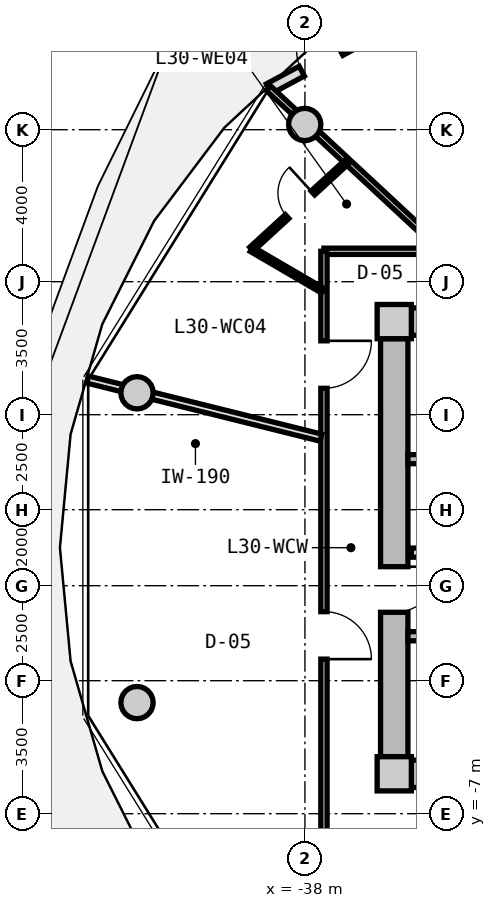
"""IFC4 building model, lengths in metres.
Left out: names, types, materials, properties, quantities, classifications, styles, units other than length and angle.
Written with IfcOpenShell. Run it as: python <this file> out.ifc"""

import sys

from ifc_helpers import new_model, si_unit, direction, frame, frame_2d, origin, origin_2d, place, context, subcontext, project, spatial, rectangle, circle, extrude, source, transform, mapped, element, fill, save


model = new_model("IFC4")
c1 = context("Model", 3, precision=1e-05, world=origin(), true_north=direction((0.0, 1.0)))
c2 = subcontext(c1, "Body", "Model", "MODEL_VIEW")
j1 = project(units=[si_unit("LENGTHUNIT", "METRE"), si_unit("PLANEANGLEUNIT", "RADIAN")], contexts=[c1])
p1 = place(None, origin())
s1 = spatial("IfcSite", under=j1, at=p1, CompositionType="ELEMENT")
p2 = place(p1, origin())
s2 = spatial("IfcBuilding", under=s1, at=p2, CompositionType="ELEMENT")
p3 = place(p2, frame((0.0, 0.0, 99.3)))
s3 = spatial("IfcBuildingStorey", under=s2, at=p3, CompositionType="ELEMENT", Elevation=99.3)
m1 = source(origin(), c2, "Body", "SweptSolid", [
    extrude(rectangle(XDim=0.9, YDim=0.9, at=origin_2d()), origin(), (0.0, 0.0, 1.0), 3.05),
])
for number, where, z_axis, x_axis in (
    (1, (-35.65, -5.95, 0.0), (0.0, 0.0, 1.0), (1.0, 0.0, 0.0)),
    (2, (-35.65, 5.95, 0.0), (0.0, 0.0, 1.0), (1.0, 0.0, 0.0)),
):
    element("IfcColumn", number, at=place(p3, frame(where, z_axis=z_axis, x_axis=x_axis)), inside=s3, PredefinedType="COLUMN", context=c2, shape_type="MappedRepresentation", body=[
        mapped(m1, transform((0.0, 0.0, 0.0), x_axis=(1.0, 0.0, 0.0), y_axis=(0.0, 1.0, 0.0), z_axis=(0.0, 0.0, 1.0), scale=1.0)),
    ])
m2 = source(origin(), c2, "Body", "SweptSolid", [
    extrude(rectangle(XDim=14.4, YDim=0.72, at=frame_2d((7.2, 0.0))), origin(), (0.0, 0.0, 1.0), 2.79),
])
for number, where, z_axis, x_axis in (
    (3, (-35.2, 5.95, 0.0), (0.0, 0.0, 1.0), (1.0, 0.0, 0.0)),
    (4, (-20.8, -5.95, 0.0), (0.0, 0.0, 1.0), (-1.0, 0.0, 0.0)),
):
    element("IfcWall", number, at=place(p3, frame(where, z_axis=z_axis, x_axis=x_axis)), inside=s3, PredefinedType="SHEAR", context=c2, shape_type="MappedRepresentation", body=[
        mapped(m2, transform((0.0, 0.0, 0.0), x_axis=(1.0, 0.0, 0.0), y_axis=(0.0, 1.0, 0.0), z_axis=(0.0, 0.0, 1.0), scale=1.0)),
    ])
m3 = source(origin(), c2, "Body", "SweptSolid", [
    extrude(rectangle(XDim=11.0, YDim=0.72, at=frame_2d((5.5, 0.0))), origin(), (0.0, 0.0, 1.0), 2.79),
])
p4 = place(p3, frame((-35.65, -5.5, 0.0), z_axis=(0.0, 0.0, 1.0), x_axis=(0.0, 1.0, 0.0)))
e5 = element("IfcWall", 5, at=p4, inside=s3, PredefinedType="SHEAR", context=c2, shape_type="MappedRepresentation", body=[
    mapped(m3, transform((0.0, 0.0, 0.0), x_axis=(1.0, 0.0, 0.0), y_axis=(0.0, 1.0, 0.0), z_axis=(0.0, 0.0, 1.0), scale=1.0)),
])
p5 = place(p4, frame((3.8, 0.0, 0.0)))
e6 = element("IfcOpeningElement", 6, at=p5, cuts=e5, PredefinedType="OPENING", context=c2, shape_type="SweptSolid", body=[
    extrude(rectangle(XDim=1.2, YDim=2.15, at=frame_2d((0.6, 1.075))), frame((0.0, 0.37, 0.0), z_axis=(0.0, -1.0, 0.0), x_axis=(1.0, 0.0, 0.0)), (0.0, 0.0, 1.0), 0.74),
])
m4 = source(origin(), c2, "Body", "SweptSolid", [
    extrude(circle(Radius=0.425, at=origin_2d()), origin(), (0.0, 0.0, 1.0), 3.05),
])
for number, where, z_axis, x_axis in (
    (7, (-38.006, 11.137, 0.0), (0.0, 0.0, 1.0), (1.0, 0.0, 0.0)),
    (8, (-42.419, 4.076, 0.0), (0.0, 0.0, 1.0), (1.0, 0.0, 0.0)),
    (9, (-42.419, -4.076, 0.0), (0.0, 0.0, 1.0), (1.0, 0.0, 0.0)),
):
    element("IfcColumn", number, at=place(p3, frame(where, z_axis=z_axis, x_axis=x_axis)), inside=s3, PredefinedType="COLUMN", context=c2, shape_type="MappedRepresentation", body=[
        mapped(m4, transform((0.0, 0.0, 0.0), x_axis=(1.0, 0.0, 0.0), y_axis=(0.0, 1.0, 0.0), z_axis=(0.0, 0.0, 1.0), scale=1.0)),
    ])
m5 = source(origin(), c2, "Body", "SweptSolid", [
    extrude(rectangle(XDim=9.351, YDim=0.29, at=frame_2d((4.675, 0.0))), origin(), (0.0, 0.0, 1.0), 2.79),
])
p6 = place(p3, frame((-38.947, 12.077, 0.0), z_axis=(0.0, 0.0, 1.0), x_axis=(0.881184411073, 0.472772708267, 0.0)))
e10 = element("IfcWall", 10, at=p6, inside=s3, PredefinedType="SOLIDWALL", context=c2, shape_type="MappedRepresentation", body=[
    mapped(m5, transform((0.0, 0.0, 0.0), x_axis=(1.0, 0.0, 0.0), y_axis=(0.0, 1.0, 0.0), z_axis=(0.0, 0.0, 1.0), scale=1.0)),
])
p7 = place(p6, frame((0.98, 0.0, 0.0)))
e11 = element("IfcOpeningElement", 11, at=p7, cuts=e10, PredefinedType="OPENING", context=c2, shape_type="SweptSolid", body=[
    extrude(rectangle(XDim=1.15, YDim=2.25, at=frame_2d((0.575, 1.125))), frame((0.0, 0.155, 0.0), z_axis=(0.0, -1.0, 0.0), x_axis=(1.0, 0.0, 0.0)), (0.0, 0.0, 1.0), 0.31),
])
p8 = place(p6, frame((5.025, 0.0, 0.85)))
e12 = element("IfcOpeningElement", 12, at=p8, cuts=e10, PredefinedType="OPENING", context=c2, shape_type="SweptSolid", body=[
    extrude(rectangle(XDim=1.2, YDim=1.5, at=frame_2d((0.6, 0.75))), frame((0.0, 0.155, 0.0), z_axis=(0.0, -1.0, 0.0), x_axis=(1.0, 0.0, 0.0)), (0.0, 0.0, 1.0), 0.31),
])
m6 = source(origin(), c2, "Body", "SweptSolid", [
    extrude(rectangle(XDim=7.83, YDim=0.24, at=frame_2d((3.915, 0.0))), origin(), (0.0, 0.0, 1.0), 2.79),
])
p9 = place(p3, frame((-35.29, 2.33, 0.0), z_axis=(0.0, 0.0, 1.0), x_axis=(1.0, 0.0, 0.0)))
e13 = element("IfcWall", 13, at=p9, inside=s3, PredefinedType="PARTITIONING", context=c2, shape_type="MappedRepresentation", body=[
    mapped(m6, transform((0.0, 0.0, 0.0), x_axis=(1.0, 0.0, 0.0), y_axis=(0.0, 1.0, 0.0), z_axis=(0.0, 0.0, 1.0), scale=1.0)),
])
p10 = place(p3, frame((-35.29, -2.33, 0.0), z_axis=(0.0, 0.0, 1.0), x_axis=(1.0, 0.0, 0.0)))
e14 = element("IfcWall", 14, at=p10, inside=s3, PredefinedType="PARTITIONING", context=c2, shape_type="MappedRepresentation", body=[
    mapped(m6, transform((0.0, 0.0, 0.0), x_axis=(1.0, 0.0, 0.0), y_axis=(0.0, 1.0, 0.0), z_axis=(0.0, 0.0, 1.0), scale=1.0)),
])
p11 = place(p10, frame((0.95, 0.0, 0.0)))
e15 = element("IfcOpeningElement", 15, at=p11, cuts=e14, PredefinedType="OPENING", context=c2, shape_type="SweptSolid", body=[
    extrude(rectangle(XDim=1.1, YDim=2.15, at=frame_2d((0.55, 1.075))), frame((0.0, 0.13, 0.0), z_axis=(0.0, -1.0, 0.0), x_axis=(1.0, 0.0, 0.0)), (0.0, 0.0, 1.0), 0.26),
])
m7 = source(origin(), c2, "Body", "SweptSolid", [
    extrude(rectangle(XDim=7.62, YDim=0.24, at=frame_2d((3.81, 0.0))), origin(), (0.0, 0.0, 1.0), 2.775),
])
p12 = place(p3, frame((-35.2, -0.13, 0.0), z_axis=(0.0, 0.0, 1.0), x_axis=(1.0, 0.0, 0.0)))
e16 = element("IfcWall", 16, at=p12, inside=s3, PredefinedType="PARTITIONING", context=c2, shape_type="MappedRepresentation", body=[
    mapped(m7, transform((0.0, 0.0, 0.0), x_axis=(1.0, 0.0, 0.0), y_axis=(0.0, 1.0, 0.0), z_axis=(0.0, 0.0, 1.0), scale=1.0)),
])
p13 = place(p12, frame((6.22, 0.0, 0.0)))
e17 = element("IfcOpeningElement", 17, at=p13, cuts=e16, PredefinedType="OPENING", context=c2, shape_type="SweptSolid", body=[
    extrude(rectangle(XDim=1.0, YDim=2.1, at=frame_2d((0.5, 1.05))), frame((0.0, 0.13, 0.0), z_axis=(0.0, -1.0, 0.0), x_axis=(1.0, 0.0, 0.0)), (0.0, 0.0, 1.0), 0.26),
])
p14 = place(p12, frame((2.4, 0.0, 0.0)))
e18 = element("IfcOpeningElement", 18, at=p14, cuts=e16, PredefinedType="OPENING", context=c2, shape_type="SweptSolid", body=[
    extrude(rectangle(XDim=1.0, YDim=2.1, at=frame_2d((0.5, 1.05))), frame((0.0, 0.13, 0.0), z_axis=(0.0, -1.0, 0.0), x_axis=(1.0, 0.0, 0.0)), (0.0, 0.0, 1.0), 0.26),
])
m8 = source(origin(), c2, "Body", "SweptSolid", [
    extrude(rectangle(XDim=8.6, YDim=0.165, at=frame_2d((4.3, 0.0))), origin(), (0.0, 0.0, 1.0), 2.775),
])
p15 = place(p3, frame((-37.5, 7.8, 0.0), z_axis=(0.0, 0.0, 1.0), x_axis=(1.0, 0.0, 0.0)))
e19 = element("IfcWall", 19, at=p15, inside=s3, PredefinedType="PARTITIONING", context=c2, shape_type="MappedRepresentation", body=[
    mapped(m8, transform((0.0, 0.0, 0.0), x_axis=(1.0, 0.0, 0.0), y_axis=(0.0, 1.0, 0.0), z_axis=(0.0, 0.0, 1.0), scale=1.0)),
])
m9 = source(origin(), c2, "Body", "SweptSolid", [
    extrude(rectangle(XDim=15.6, YDim=0.165, at=frame_2d((7.8, 0.0))), origin(), (0.0, 0.0, 1.0), 2.775),
])
p16 = place(p3, frame((-37.5, -7.8, 0.0), z_axis=(0.0, 0.0, 1.0), x_axis=(0.0, 1.0, 0.0)))
e20 = element("IfcWall", 20, at=p16, inside=s3, PredefinedType="PARTITIONING", context=c2, shape_type="MappedRepresentation", body=[
    mapped(m9, transform((0.0, 0.0, 0.0), x_axis=(1.0, 0.0, 0.0), y_axis=(0.0, 1.0, 0.0), z_axis=(0.0, 0.0, 1.0), scale=1.0)),
])
p17 = place(p16, frame((11.994, 0.0, 0.0)))
e21 = element("IfcOpeningElement", 21, at=p17, cuts=e20, PredefinedType="OPENING", context=c2, shape_type="SweptSolid", body=[
    extrude(rectangle(XDim=1.25, YDim=2.2, at=frame_2d((0.625, 1.1))), frame((0.0, 0.093, 0.0), z_axis=(0.0, -1.0, 0.0), x_axis=(1.0, 0.0, 0.0)), (0.0, 0.0, 1.0), 0.185),
])
p18 = place(p16, frame((4.867, 0.0, 0.0)))
e22 = element("IfcOpeningElement", 22, at=p18, cuts=e20, PredefinedType="OPENING", context=c2, shape_type="SweptSolid", body=[
    extrude(rectangle(XDim=1.25, YDim=2.2, at=frame_2d((0.625, 1.1))), frame((0.0, 0.093, 0.0), z_axis=(0.0, -1.0, 0.0), x_axis=(1.0, 0.0, 0.0)), (0.0, 0.0, 1.0), 0.185),
])
m10 = source(origin(), c2, "Body", "SweptSolid", [
    extrude(rectangle(XDim=6.187, YDim=0.165, at=frame_2d((3.093, 0.0))), origin(), (0.0, 0.0, 1.0), 2.275),
])
p19 = place(p3, frame((-34.429, 7.88, 0.0), z_axis=(0.0, 0.0, 1.0), x_axis=(-0.732501077882, 0.680765870841, 0.0)))
e23 = element("IfcWall", 23, at=p19, inside=s3, PredefinedType="PARTITIONING", context=c2, shape_type="MappedRepresentation", body=[
    mapped(m10, transform((0.0, 0.0, 0.0), x_axis=(1.0, 0.0, 0.0), y_axis=(0.0, 1.0, 0.0), z_axis=(0.0, 0.0, 1.0), scale=1.0)),
])
m11 = source(origin(), c2, "Body", "SweptSolid", [
    extrude(rectangle(XDim=6.331, YDim=0.19, at=frame_2d((3.165, 0.0))), origin(), (0.0, 0.0, 1.0), 2.275),
])
p20 = place(p3, frame((-37.58, 2.896, 0.0), z_axis=(0.0, 0.0, 1.0), x_axis=(-0.97036440661, 0.241646267062, 0.0)))
e24 = element("IfcWall", 24, at=p20, inside=s3, PredefinedType="PARTITIONING", context=c2, shape_type="MappedRepresentation", body=[
    mapped(m11, transform((0.0, 0.0, 0.0), x_axis=(1.0, 0.0, 0.0), y_axis=(0.0, 1.0, 0.0), z_axis=(0.0, 0.0, 1.0), scale=1.0)),
])
m12 = source(origin(), c2, "Body", "SweptSolid", [
    extrude(rectangle(XDim=2.172, YDim=0.14, at=frame_2d((1.086, 0.0))), origin(), (0.0, 0.0, 1.0), 2.775),
])
p21 = place(p3, frame((-37.53, 6.762, 0.0), z_axis=(0.0, 0.0, 1.0), x_axis=(-0.863562702562, 0.504241468688, 0.0)))
e25 = element("IfcWall", 25, at=p21, inside=s3, PredefinedType="PARTITIONING", context=c2, shape_type="MappedRepresentation", body=[
    mapped(m12, transform((0.0, 0.0, 0.0), x_axis=(1.0, 0.0, 0.0), y_axis=(0.0, 1.0, 0.0), z_axis=(0.0, 0.0, 1.0), scale=1.0)),
])
m13 = source(origin(), c2, "Body", "SweptSolid", [
    extrude(rectangle(XDim=3.457, YDim=0.14, at=frame_2d((1.729, 0.0))), origin(), (0.0, 0.0, 1.0), 2.775),
])
p22 = place(p3, frame((-39.405, 7.857, 0.0), z_axis=(0.0, 0.0, 1.0), x_axis=(0.737567375492, 0.675273549467, 0.0)))
e26 = element("IfcWall", 26, at=p22, inside=s3, PredefinedType="PARTITIONING", context=c2, shape_type="MappedRepresentation", body=[
    mapped(m13, transform((0.0, 0.0, 0.0), x_axis=(1.0, 0.0, 0.0), y_axis=(0.0, 1.0, 0.0), z_axis=(0.0, 0.0, 1.0), scale=1.0)),
])
p23 = place(p22, frame((1.268, 0.0, 0.0)))
e27 = element("IfcOpeningElement", 27, at=p23, cuts=e26, PredefinedType="OPENING", context=c2, shape_type="SweptSolid", body=[
    extrude(rectangle(XDim=0.92, YDim=2.1, at=frame_2d((0.46, 1.05))), frame((0.0, 0.08, 0.0), z_axis=(0.0, -1.0, 0.0), x_axis=(1.0, 0.0, 0.0)), (0.0, 0.0, 1.0), 0.16),
])
m14 = source(origin(), c2, "Body", "SweptSolid", [
    extrude(rectangle(XDim=1.15, YDim=2.25, at=frame_2d((0.575, 1.125))), frame((0.0, 0.025, 0.0), z_axis=(0.0, -1.0, 0.0), x_axis=(1.0, 0.0, 0.0)), (0.0, 0.0, 1.0), 0.05),
])
p24 = place(p7, origin())
e28 = element("IfcDoor", 28, at=p24, inside=s3, OperationType="SINGLE_SWING_RIGHT", PredefinedType="DOOR", context=c2, shape_type="MappedRepresentation", body=[
    mapped(m14, transform((0.0, 0.0, 0.0), x_axis=(1.0, 0.0, 0.0), y_axis=(0.0, 1.0, 0.0), z_axis=(0.0, 0.0, 1.0), scale=1.0)),
])
fill(e11, e28)
m15 = source(origin(), c2, "Body", "SweptSolid", [
    extrude(rectangle(XDim=1.2, YDim=2.15, at=frame_2d((0.6, 1.075))), frame((0.0, 0.025, 0.0), z_axis=(0.0, -1.0, 0.0), x_axis=(1.0, 0.0, 0.0)), (0.0, 0.0, 1.0), 0.05),
])
p25 = place(p5, frame((1.2, 0.0, 0.0), z_axis=(0.0, 0.0, 1.0), x_axis=(-1.0, 0.0, 0.0)))
e29 = element("IfcDoor", 29, at=p25, inside=s3, OperationType="SINGLE_SWING_LEFT", PredefinedType="DOOR", context=c2, shape_type="MappedRepresentation", body=[
    mapped(m15, transform((0.0, 0.0, 0.0), x_axis=(1.0, 0.0, 0.0), y_axis=(0.0, 1.0, 0.0), z_axis=(0.0, 0.0, 1.0), scale=1.0)),
])
fill(e6, e29)
m16 = source(origin(), c2, "Body", "SweptSolid", [
    extrude(rectangle(XDim=1.25, YDim=2.2, at=frame_2d((0.625, 1.1))), frame((0.0, 0.025, 0.0), z_axis=(0.0, -1.0, 0.0), x_axis=(1.0, 0.0, 0.0)), (0.0, 0.0, 1.0), 0.05),
])
p26 = place(p17, frame((1.25, 0.0, 0.0), z_axis=(0.0, 0.0, 1.0), x_axis=(-1.0, 0.0, 0.0)))
e30 = element("IfcDoor", 30, at=p26, inside=s3, OperationType="SINGLE_SWING_LEFT", PredefinedType="DOOR", context=c2, shape_type="MappedRepresentation", body=[
    mapped(m16, transform((0.0, 0.0, 0.0), x_axis=(1.0, 0.0, 0.0), y_axis=(0.0, 1.0, 0.0), z_axis=(0.0, 0.0, 1.0), scale=1.0)),
])
fill(e21, e30)
m17 = source(origin(), c2, "Body", "SweptSolid", [
    extrude(rectangle(XDim=0.92, YDim=2.1, at=frame_2d((0.46, 1.05))), frame((0.0, 0.025, 0.0), z_axis=(0.0, -1.0, 0.0), x_axis=(1.0, 0.0, 0.0)), (0.0, 0.0, 1.0), 0.05),
])
p27 = place(p23, origin())
e31 = element("IfcDoor", 31, at=p27, inside=s3, OperationType="SINGLE_SWING_RIGHT", PredefinedType="DOOR", context=c2, shape_type="MappedRepresentation", body=[
    mapped(m17, transform((0.0, 0.0, 0.0), x_axis=(1.0, 0.0, 0.0), y_axis=(0.0, 1.0, 0.0), z_axis=(0.0, 0.0, 1.0), scale=1.0)),
])
fill(e27, e31)
p28 = place(p18, frame((1.25, 0.0, 0.0), z_axis=(0.0, 0.0, 1.0), x_axis=(-1.0, 0.0, 0.0)))
e32 = element("IfcDoor", 32, at=p28, inside=s3, OperationType="SINGLE_SWING_RIGHT", PredefinedType="DOOR", context=c2, shape_type="MappedRepresentation", body=[
    mapped(m16, transform((0.0, 0.0, 0.0), x_axis=(1.0, 0.0, 0.0), y_axis=(0.0, 1.0, 0.0), z_axis=(0.0, 0.0, 1.0), scale=1.0)),
])
fill(e22, e32)
save(model, sys.argv[1])
